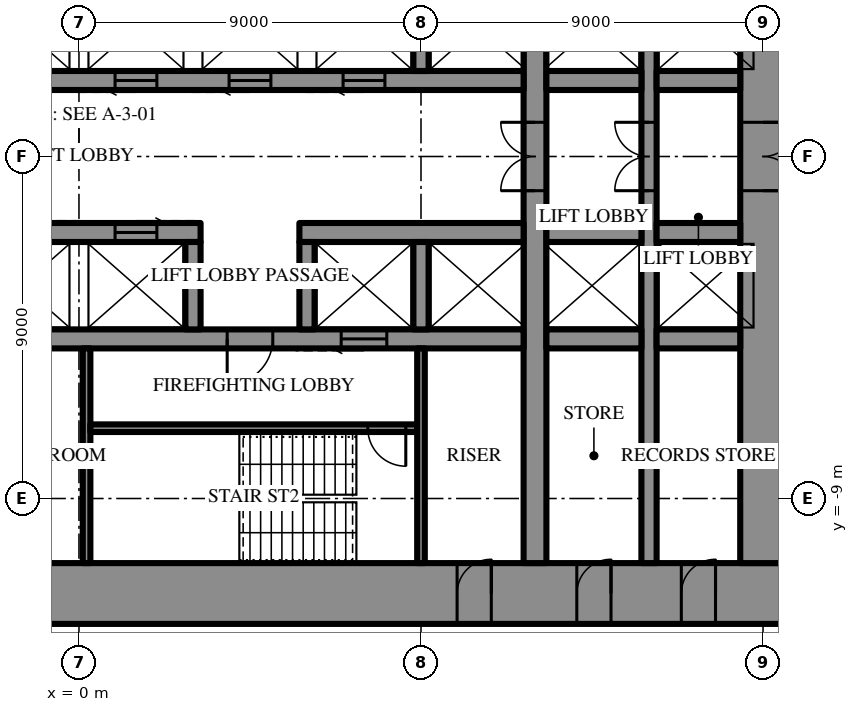
"""IFC4 building model, lengths in metres.
Left out: names, types, materials, properties, quantities, classifications, styles, units other than length and angle.
Written with IfcOpenShell. Run it as: python <this file> out.ifc"""

import sys

from ifc_helpers import new_model, si_unit, direction, frame, frame_2d, origin, place, context, subcontext, project, spatial, rectangle, extrude, element, fill, save


model = new_model("IFC4")
c1 = context("Model", 3, precision=1e-05, world=origin(), true_north=direction((0.0, 1.0)))
c2 = subcontext(c1, "Body", "Model", "MODEL_VIEW")
j1 = project(units=[si_unit("LENGTHUNIT", "METRE"), si_unit("PLANEANGLEUNIT", "RADIAN")], contexts=[c1])
p1 = place(None, origin())
s1 = spatial("IfcSite", under=j1, at=p1, CompositionType="ELEMENT")
p2 = place(p1, origin())
s2 = spatial("IfcBuilding", under=s1, at=p2, CompositionType="ELEMENT")
p3 = place(p2, frame((0.0, 0.0, 31.9)))
s3 = spatial("IfcBuildingStorey", under=s2, at=p3, CompositionType="ELEMENT", Elevation=31.9)
p4 = place(p3, frame((18.6, -11.5, 0.0), z_axis=(0.0, 0.0, 1.0), x_axis=(-1.0, 0.0, 0.0)))
e1 = element("IfcWall", 1, at=p4, inside=s3, PredefinedType="SHEAR", context=c2, shape_type="SweptSolid", body=[
    extrude(rectangle(XDim=37.2, YDim=1.6, at=frame_2d((18.6, 0.0))), origin(), (0.0, 0.0, 1.0), 4.2),
])
p5 = place(p4, frame((19.45, 0.0, 0.0)))
e2 = element("IfcOpeningElement", 2, at=p5, cuts=e1, PredefinedType="OPENING", context=c2, shape_type="SweptSolid", body=[
    extrude(rectangle(XDim=0.9, YDim=2.2, at=frame_2d((0.45, 1.1))), frame((0.0, 0.81, 0.0), z_axis=(0.0, -1.0, 0.0), x_axis=(1.0, 0.0, 0.0)), (0.0, 0.0, 1.0), 1.62),
])
p6 = place(p4, frame((22.45, 0.0, 0.0)))
e3 = element("IfcOpeningElement", 3, at=p6, cuts=e1, PredefinedType="OPENING", context=c2, shape_type="SweptSolid", body=[
    extrude(rectangle(XDim=0.9, YDim=2.2, at=frame_2d((0.45, 1.1))), frame((0.0, 0.81, 0.0), z_axis=(0.0, -1.0, 0.0), x_axis=(1.0, 0.0, 0.0)), (0.0, 0.0, 1.0), 1.62),
])
p7 = place(p4, frame((25.5, 0.0, 0.0)))
e4 = element("IfcOpeningElement", 4, at=p7, cuts=e1, PredefinedType="OPENING", context=c2, shape_type="SweptSolid", body=[
    extrude(rectangle(XDim=1.0, YDim=2.2, at=frame_2d((0.5, 1.1))), frame((0.0, 0.81, 0.0), z_axis=(0.0, -1.0, 0.0), x_axis=(1.0, 0.0, 0.0)), (0.0, 0.0, 1.0), 1.62),
])
p8 = place(p4, frame((1.85, 0.0, 0.0)))
e5 = element("IfcOpeningElement", 5, at=p8, cuts=e1, PredefinedType="OPENING", context=c2, shape_type="SweptSolid", body=[
    extrude(rectangle(XDim=0.9, YDim=2.2, at=frame_2d((0.45, 1.1))), frame((0.0, 0.81, 0.0), z_axis=(0.0, -1.0, 0.0), x_axis=(1.0, 0.0, 0.0)), (0.0, 0.0, 1.0), 1.62),
])
p9 = place(p4, frame((4.6, 0.0, 0.0)))
e6 = element("IfcOpeningElement", 6, at=p9, cuts=e1, PredefinedType="OPENING", context=c2, shape_type="SweptSolid", body=[
    extrude(rectangle(XDim=0.9, YDim=2.2, at=frame_2d((0.45, 1.1))), frame((0.0, 0.81, 0.0), z_axis=(0.0, -1.0, 0.0), x_axis=(1.0, 0.0, 0.0)), (0.0, 0.0, 1.0), 1.62),
])
p10 = place(p4, frame((7.75, 0.0, 0.0)))
e7 = element("IfcOpeningElement", 7, at=p10, cuts=e1, PredefinedType="OPENING", context=c2, shape_type="SweptSolid", body=[
    extrude(rectangle(XDim=0.9, YDim=2.2, at=frame_2d((0.45, 1.1))), frame((0.0, 0.81, 0.0), z_axis=(0.0, -1.0, 0.0), x_axis=(1.0, 0.0, 0.0)), (0.0, 0.0, 1.0), 1.62),
])
p11 = place(p4, frame((28.55, 0.0, 0.0)))
e8 = element("IfcOpeningElement", 8, at=p11, cuts=e1, PredefinedType="OPENING", context=c2, shape_type="SweptSolid", body=[
    extrude(rectangle(XDim=0.9, YDim=2.2, at=frame_2d((0.45, 1.1))), frame((0.0, 0.81, 0.0), z_axis=(0.0, -1.0, 0.0), x_axis=(1.0, 0.0, 0.0)), (0.0, 0.0, 1.0), 1.62),
])
p12 = place(p4, frame((31.7, 0.0, 0.0)))
e9 = element("IfcOpeningElement", 9, at=p12, cuts=e1, PredefinedType="OPENING", context=c2, shape_type="SweptSolid", body=[
    extrude(rectangle(XDim=0.9, YDim=2.2, at=frame_2d((0.45, 1.1))), frame((0.0, 0.81, 0.0), z_axis=(0.0, -1.0, 0.0), x_axis=(1.0, 0.0, 0.0)), (0.0, 0.0, 1.0), 1.62),
])
p13 = place(p4, frame((34.45, 0.0, 0.0)))
e10 = element("IfcOpeningElement", 10, at=p13, cuts=e1, PredefinedType="OPENING", context=c2, shape_type="SweptSolid", body=[
    extrude(rectangle(XDim=0.9, YDim=2.2, at=frame_2d((0.45, 1.1))), frame((0.0, 0.81, 0.0), z_axis=(0.0, -1.0, 0.0), x_axis=(1.0, 0.0, 0.0)), (0.0, 0.0, 1.0), 1.62),
])
p14 = place(p3, frame((18.0, -10.7, 0.0), z_axis=(0.0, 0.0, 1.0), x_axis=(0.0, 1.0, 0.0)))
e11 = element("IfcWall", 11, at=p14, inside=s3, PredefinedType="SHEAR", context=c2, shape_type="SweptSolid", body=[
    extrude(rectangle(XDim=21.4, YDim=1.2, at=frame_2d((10.7, 0.0))), origin(), (0.0, 0.0, 1.0), 4.2),
])
p15 = place(p14, frame((9.8, 0.0, 0.0)))
e12 = element("IfcOpeningElement", 12, at=p15, cuts=e11, PredefinedType="OPENING", context=c2, shape_type="SweptSolid", body=[
    extrude(rectangle(XDim=1.8, YDim=2.4, at=frame_2d((0.9, 1.2))), frame((0.0, 0.61, 0.0), z_axis=(0.0, -1.0, 0.0), x_axis=(1.0, 0.0, 0.0)), (0.0, 0.0, 1.0), 1.22),
])
p16 = place(p3, frame((12.0, -10.7, 0.0), z_axis=(0.0, 0.0, 1.0), x_axis=(0.0, 1.0, 0.0)))
e13 = element("IfcWall", 13, at=p16, inside=s3, PredefinedType="SHEAR", context=c2, shape_type="SweptSolid", body=[
    extrude(rectangle(XDim=21.4, YDim=0.6, at=frame_2d((10.7, 0.0))), origin(), (0.0, 0.0, 1.0), 4.2),
])
p17 = place(p16, frame((9.8, 0.0, 0.0)))
e14 = element("IfcOpeningElement", 14, at=p17, cuts=e13, PredefinedType="OPENING", context=c2, shape_type="SweptSolid", body=[
    extrude(rectangle(XDim=1.8, YDim=2.4, at=frame_2d((0.9, 1.2))), frame((0.0, 0.31, 0.0), z_axis=(0.0, -1.0, 0.0), x_axis=(1.0, 0.0, 0.0)), (0.0, 0.0, 1.0), 0.62),
])
p18 = place(p3, frame((15.0, -10.7, 0.0), z_axis=(0.0, 0.0, 1.0), x_axis=(0.0, 1.0, 0.0)))
e15 = element("IfcWall", 15, at=p18, inside=s3, PredefinedType="SHEAR", context=c2, shape_type="SweptSolid", body=[
    extrude(rectangle(XDim=21.4, YDim=0.4, at=frame_2d((10.7, 0.0))), origin(), (0.0, 0.0, 1.0), 4.2),
])
p19 = place(p18, frame((9.8, 0.0, 0.0)))
e16 = element("IfcOpeningElement", 16, at=p19, cuts=e15, PredefinedType="OPENING", context=c2, shape_type="SweptSolid", body=[
    extrude(rectangle(XDim=1.8, YDim=2.4, at=frame_2d((0.9, 1.2))), frame((0.0, 0.21, 0.0), z_axis=(0.0, -1.0, 0.0), x_axis=(1.0, 0.0, 0.0)), (0.0, 0.0, 1.0), 0.42),
])
p20 = place(p3, frame((-3.2, 2.0, 0.0), z_axis=(0.0, 0.0, 1.0), x_axis=(1.0, 0.0, 0.0)))
e17 = element("IfcWall", 17, at=p20, inside=s3, PredefinedType="SHEAR", context=c2, shape_type="SweptSolid", body=[
    extrude(rectangle(XDim=14.9, YDim=0.5, at=frame_2d((7.45, 0.0))), origin(), (0.0, 0.0, 1.0), 4.2),
])
p21 = place(p20, frame((1.15, 0.0, 0.0)))
e18 = element("IfcOpeningElement", 18, at=p21, cuts=e17, PredefinedType="OPENING", context=c2, shape_type="SweptSolid", body=[
    extrude(rectangle(XDim=1.1, YDim=2.2, at=frame_2d((0.55, 1.1))), frame((0.0, 0.26, 0.0), z_axis=(0.0, -1.0, 0.0), x_axis=(1.0, 0.0, 0.0)), (0.0, 0.0, 1.0), 0.52),
])
p22 = place(p20, frame((4.15, 0.0, 0.0)))
e19 = element("IfcOpeningElement", 19, at=p22, cuts=e17, PredefinedType="OPENING", context=c2, shape_type="SweptSolid", body=[
    extrude(rectangle(XDim=1.1, YDim=2.2, at=frame_2d((0.55, 1.1))), frame((0.0, 0.26, 0.0), z_axis=(0.0, -1.0, 0.0), x_axis=(1.0, 0.0, 0.0)), (0.0, 0.0, 1.0), 0.52),
])
p23 = place(p20, frame((7.15, 0.0, 0.0)))
e20 = element("IfcOpeningElement", 20, at=p23, cuts=e17, PredefinedType="OPENING", context=c2, shape_type="SweptSolid", body=[
    extrude(rectangle(XDim=1.1, YDim=2.2, at=frame_2d((0.55, 1.1))), frame((0.0, 0.26, 0.0), z_axis=(0.0, -1.0, 0.0), x_axis=(1.0, 0.0, 0.0)), (0.0, 0.0, 1.0), 0.52),
])
p24 = place(p20, frame((10.15, 0.0, 0.0)))
e21 = element("IfcOpeningElement", 21, at=p24, cuts=e17, PredefinedType="OPENING", context=c2, shape_type="SweptSolid", body=[
    extrude(rectangle(XDim=1.1, YDim=2.2, at=frame_2d((0.55, 1.1))), frame((0.0, 0.26, 0.0), z_axis=(0.0, -1.0, 0.0), x_axis=(1.0, 0.0, 0.0)), (0.0, 0.0, 1.0), 0.52),
])
p25 = place(p3, frame((12.3, 2.0, 0.0), z_axis=(0.0, 0.0, 1.0), x_axis=(1.0, 0.0, 0.0)))
e22 = element("IfcWall", 22, at=p25, inside=s3, PredefinedType="SHEAR", context=c2, shape_type="SweptSolid", body=[
    extrude(rectangle(XDim=2.5, YDim=0.5, at=frame_2d((1.25, 0.0))), origin(), (0.0, 0.0, 1.0), 4.2),
])
p26 = place(p3, frame((15.2, 2.0, 0.0), z_axis=(0.0, 0.0, 1.0), x_axis=(1.0, 0.0, 0.0)))
e23 = element("IfcWall", 23, at=p26, inside=s3, PredefinedType="SHEAR", context=c2, shape_type="SweptSolid", body=[
    extrude(rectangle(XDim=2.2, YDim=0.5, at=frame_2d((1.1, 0.0))), origin(), (0.0, 0.0, 1.0), 4.2),
])
p27 = place(p3, frame((9.0, 2.25, 0.0), z_axis=(0.0, 0.0, 1.0), x_axis=(0.0, 1.0, 0.0)))
e24 = element("IfcWall", 24, at=p27, inside=s3, PredefinedType="SHEAR", context=c2, shape_type="SweptSolid", body=[
    extrude(rectangle(XDim=2.3, YDim=0.4, at=frame_2d((1.15, 0.0))), origin(), (0.0, 0.0, 1.0), 4.2),
])
p28 = place(p3, frame((17.4, -2.0, 0.0), z_axis=(0.0, 0.0, 1.0), x_axis=(-1.0, 0.0, 0.0)))
e25 = element("IfcWall", 25, at=p28, inside=s3, PredefinedType="SHEAR", context=c2, shape_type="SweptSolid", body=[
    extrude(rectangle(XDim=2.2, YDim=0.5, at=frame_2d((1.1, 0.0))), origin(), (0.0, 0.0, 1.0), 4.2),
])
p29 = place(p3, frame((14.8, -2.0, 0.0), z_axis=(0.0, 0.0, 1.0), x_axis=(-1.0, 0.0, 0.0)))
e26 = element("IfcWall", 26, at=p29, inside=s3, PredefinedType="SHEAR", context=c2, shape_type="SweptSolid", body=[
    extrude(rectangle(XDim=2.5, YDim=0.5, at=frame_2d((1.25, 0.0))), origin(), (0.0, 0.0, 1.0), 4.2),
])
p30 = place(p3, frame((11.7, -2.0, 0.0), z_axis=(0.0, 0.0, 1.0), x_axis=(-1.0, 0.0, 0.0)))
e27 = element("IfcWall", 27, at=p30, inside=s3, PredefinedType="SHEAR", context=c2, shape_type="SweptSolid", body=[
    extrude(rectangle(XDim=5.9, YDim=0.5, at=frame_2d((2.95, 0.0))), origin(), (0.0, 0.0, 1.0), 4.2),
])
p31 = place(p3, frame((3.2, -2.0, 0.0), z_axis=(0.0, 0.0, 1.0), x_axis=(-1.0, 0.0, 0.0)))
e28 = element("IfcWall", 28, at=p31, inside=s3, PredefinedType="SHEAR", context=c2, shape_type="SweptSolid", body=[
    extrude(rectangle(XDim=14.9, YDim=0.5, at=frame_2d((7.45, 0.0))), origin(), (0.0, 0.0, 1.0), 4.2),
])
p32 = place(p31, frame((1.15, 0.0, 0.0)))
e29 = element("IfcOpeningElement", 29, at=p32, cuts=e28, PredefinedType="OPENING", context=c2, shape_type="SweptSolid", body=[
    extrude(rectangle(XDim=1.1, YDim=2.2, at=frame_2d((0.55, 1.1))), frame((0.0, 0.26, 0.0), z_axis=(0.0, -1.0, 0.0), x_axis=(1.0, 0.0, 0.0)), (0.0, 0.0, 1.0), 0.52),
])
p33 = place(p31, frame((4.15, 0.0, 0.0)))
e30 = element("IfcOpeningElement", 30, at=p33, cuts=e28, PredefinedType="OPENING", context=c2, shape_type="SweptSolid", body=[
    extrude(rectangle(XDim=1.1, YDim=2.2, at=frame_2d((0.55, 1.1))), frame((0.0, 0.26, 0.0), z_axis=(0.0, -1.0, 0.0), x_axis=(1.0, 0.0, 0.0)), (0.0, 0.0, 1.0), 0.52),
])
p34 = place(p31, frame((7.15, 0.0, 0.0)))
e31 = element("IfcOpeningElement", 31, at=p34, cuts=e28, PredefinedType="OPENING", context=c2, shape_type="SweptSolid", body=[
    extrude(rectangle(XDim=1.1, YDim=2.2, at=frame_2d((0.55, 1.1))), frame((0.0, 0.26, 0.0), z_axis=(0.0, -1.0, 0.0), x_axis=(1.0, 0.0, 0.0)), (0.0, 0.0, 1.0), 0.52),
])
p35 = place(p31, frame((10.15, 0.0, 0.0)))
e32 = element("IfcOpeningElement", 32, at=p35, cuts=e28, PredefinedType="OPENING", context=c2, shape_type="SweptSolid", body=[
    extrude(rectangle(XDim=1.1, YDim=2.2, at=frame_2d((0.55, 1.1))), frame((0.0, 0.26, 0.0), z_axis=(0.0, -1.0, 0.0), x_axis=(1.0, 0.0, 0.0)), (0.0, 0.0, 1.0), 0.52),
])
p36 = place(p3, frame((17.4, -4.8, 0.0), z_axis=(0.0, 0.0, 1.0), x_axis=(-1.0, 0.0, 0.0)))
e33 = element("IfcWall", 33, at=p36, inside=s3, PredefinedType="SHEAR", context=c2, shape_type="SweptSolid", body=[
    extrude(rectangle(XDim=2.2, YDim=0.5, at=frame_2d((1.1, 0.0))), origin(), (0.0, 0.0, 1.0), 4.2),
])
p37 = place(p3, frame((14.8, -4.8, 0.0), z_axis=(0.0, 0.0, 1.0), x_axis=(-1.0, 0.0, 0.0)))
e34 = element("IfcWall", 34, at=p37, inside=s3, PredefinedType="SHEAR", context=c2, shape_type="SweptSolid", body=[
    extrude(rectangle(XDim=2.5, YDim=0.5, at=frame_2d((1.25, 0.0))), origin(), (0.0, 0.0, 1.0), 4.2),
])
p38 = place(p3, frame((11.7, -4.8, 0.0), z_axis=(0.0, 0.0, 1.0), x_axis=(-1.0, 0.0, 0.0)))
e35 = element("IfcWall", 35, at=p38, inside=s3, PredefinedType="SHEAR", context=c2, shape_type="SweptSolid", body=[
    extrude(rectangle(XDim=23.4, YDim=0.5, at=frame_2d((11.7, 0.0))), origin(), (0.0, 0.0, 1.0), 4.2),
])
p39 = place(p38, frame((6.6, 0.0, 0.0)))
e36 = element("IfcOpeningElement", 36, at=p39, cuts=e35, PredefinedType="OPENING", context=c2, shape_type="SweptSolid", body=[
    extrude(rectangle(XDim=1.2, YDim=2.2, at=frame_2d((0.6, 1.1))), frame((0.0, 0.26, 0.0), z_axis=(0.0, -1.0, 0.0), x_axis=(1.0, 0.0, 0.0)), (0.0, 0.0, 1.0), 0.52),
])
p40 = place(p38, frame((3.6, 0.0, 0.0)))
e37 = element("IfcOpeningElement", 37, at=p40, cuts=e35, PredefinedType="OPENING", context=c2, shape_type="SweptSolid", body=[
    extrude(rectangle(XDim=1.2, YDim=2.2, at=frame_2d((0.6, 1.1))), frame((0.0, 0.26, 0.0), z_axis=(0.0, -1.0, 0.0), x_axis=(1.0, 0.0, 0.0)), (0.0, 0.0, 1.0), 0.52),
])
for number, where, z_axis, x_axis in (
    (38, (9.0, -2.25, 0.0), (0.0, 0.0, 1.0), (0.0, -1.0, 0.0)),
    (39, (6.0, -2.25, 0.0), (0.0, 0.0, 1.0), (0.0, -1.0, 0.0)),
    (40, (3.0, -2.25, 0.0), (0.0, 0.0, 1.0), (0.0, -1.0, 0.0)),
):
    element("IfcWall", number, at=place(p3, frame(where, z_axis=z_axis, x_axis=x_axis)), inside=s3, PredefinedType="SHEAR", context=c2, shape_type="SweptSolid", body=[
        extrude(rectangle(XDim=2.3, YDim=0.4, at=frame_2d((1.15, 0.0))), origin(), (0.0, 0.0, 1.0), 4.2),
    ])
p41 = place(p3, frame((0.2, -5.05, 0.0), z_axis=(0.0, 0.0, 1.0), x_axis=(0.0, -1.0, 0.0)))
e41 = element("IfcWall", 41, at=p41, inside=s3, PredefinedType="SHEAR", context=c2, shape_type="SweptSolid", body=[
    extrude(rectangle(XDim=5.65, YDim=0.2, at=frame_2d((2.825, 0.0))), origin(), (0.0, 0.0, 1.0), 4.2),
])
p42 = place(p3, frame((8.9, -7.15, 0.0), z_axis=(0.0, 0.0, 1.0), x_axis=(-1.0, 0.0, 0.0)))
e42 = element("IfcWall", 42, at=p42, inside=s3, PredefinedType="SHEAR", context=c2, shape_type="SweptSolid", body=[
    extrude(rectangle(XDim=8.6, YDim=0.2, at=frame_2d((4.3, 0.0))), origin(), (0.0, 0.0, 1.0), 4.2),
])
p43 = place(p42, frame((0.3, 0.0, 0.0)))
e43 = element("IfcOpeningElement", 43, at=p43, cuts=e42, PredefinedType="OPENING", context=c2, shape_type="SweptSolid", body=[
    extrude(rectangle(XDim=1.0, YDim=2.2, at=frame_2d((0.5, 1.1))), frame((0.0, 0.11, 0.0), z_axis=(0.0, -1.0, 0.0), x_axis=(1.0, 0.0, 0.0)), (0.0, 0.0, 1.0), 0.22),
])
p44 = place(p3, frame((9.0, -5.05, 0.0), z_axis=(0.0, 0.0, 1.0), x_axis=(0.0, -1.0, 0.0)))
e44 = element("IfcWall", 44, at=p44, inside=s3, PredefinedType="PARTITIONING", context=c2, shape_type="SweptSolid", body=[
    extrude(rectangle(XDim=5.65, YDim=0.2, at=frame_2d((2.825, 0.0))), origin(), (0.0, 0.0, 1.0), 4.0),
])
p45 = place(p15, frame((1.8, 0.0, 0.0), z_axis=(0.0, 0.0, 1.0), x_axis=(-1.0, 0.0, 0.0)))
e45 = element("IfcDoor", 45, at=p45, inside=s3, OperationType="DOUBLE_DOOR_SINGLE_SWING", PredefinedType="DOOR", context=c2, shape_type="SweptSolid", body=[
    extrude(rectangle(XDim=1.8, YDim=2.4, at=frame_2d((0.9, 1.2))), frame((0.0, 0.025, 0.0), z_axis=(0.0, -1.0, 0.0), x_axis=(1.0, 0.0, 0.0)), (0.0, 0.0, 1.0), 0.05),
])
fill(e12, e45)
p46 = place(p39, origin())
e46 = element("IfcDoor", 46, at=p46, inside=s3, OperationType="SINGLE_SWING_LEFT", PredefinedType="DOOR", context=c2, shape_type="SweptSolid", body=[
    extrude(rectangle(XDim=1.2, YDim=2.2, at=frame_2d((0.6, 1.1))), frame((0.0, 0.025, 0.0), z_axis=(0.0, -1.0, 0.0), x_axis=(1.0, 0.0, 0.0)), (0.0, 0.0, 1.0), 0.05),
])
fill(e36, e46)
p47 = place(p43, origin())
e47 = element("IfcDoor", 47, at=p47, inside=s3, OperationType="SINGLE_SWING_RIGHT", PredefinedType="DOOR", context=c2, shape_type="SweptSolid", body=[
    extrude(rectangle(XDim=1.0, YDim=2.2, at=frame_2d((0.5, 1.1))), frame((0.0, 0.025, 0.0), z_axis=(0.0, -1.0, 0.0), x_axis=(1.0, 0.0, 0.0)), (0.0, 0.0, 1.0), 0.05),
])
fill(e43, e47)
p48 = place(p8, frame((0.9, 0.0, 0.0), z_axis=(0.0, 0.0, 1.0), x_axis=(-1.0, 0.0, 0.0)))
e48 = element("IfcDoor", 48, at=p48, inside=s3, OperationType="SINGLE_SWING_LEFT", PredefinedType="DOOR", context=c2, shape_type="SweptSolid", body=[
    extrude(rectangle(XDim=0.9, YDim=2.2, at=frame_2d((0.45, 1.1))), frame((0.0, 0.025, 0.0), z_axis=(0.0, -1.0, 0.0), x_axis=(1.0, 0.0, 0.0)), (0.0, 0.0, 1.0), 0.05),
])
fill(e5, e48)
p49 = place(p9, frame((0.9, 0.0, 0.0), z_axis=(0.0, 0.0, 1.0), x_axis=(-1.0, 0.0, 0.0)))
e49 = element("IfcDoor", 49, at=p49, inside=s3, OperationType="SINGLE_SWING_LEFT", PredefinedType="DOOR", context=c2, shape_type="SweptSolid", body=[
    extrude(rectangle(XDim=0.9, YDim=2.2, at=frame_2d((0.45, 1.1))), frame((0.0, 0.025, 0.0), z_axis=(0.0, -1.0, 0.0), x_axis=(1.0, 0.0, 0.0)), (0.0, 0.0, 1.0), 0.05),
])
fill(e6, e49)
p50 = place(p10, frame((0.9, 0.0, 0.0), z_axis=(0.0, 0.0, 1.0), x_axis=(-1.0, 0.0, 0.0)))
e50 = element("IfcDoor", 50, at=p50, inside=s3, OperationType="SINGLE_SWING_LEFT", PredefinedType="DOOR", context=c2, shape_type="SweptSolid", body=[
    extrude(rectangle(XDim=0.9, YDim=2.2, at=frame_2d((0.45, 1.1))), frame((0.0, 0.025, 0.0), z_axis=(0.0, -1.0, 0.0), x_axis=(1.0, 0.0, 0.0)), (0.0, 0.0, 1.0), 0.05),
])
fill(e7, e50)
p51 = place(p17, origin())
e51 = element("IfcDoor", 51, at=p51, inside=s3, OperationType="DOUBLE_DOOR_SINGLE_SWING", PredefinedType="DOOR", context=c2, shape_type="SweptSolid", body=[
    extrude(rectangle(XDim=1.8, YDim=2.4, at=frame_2d((0.9, 1.2))), frame((0.0, 0.025, 0.0), z_axis=(0.0, -1.0, 0.0), x_axis=(1.0, 0.0, 0.0)), (0.0, 0.0, 1.0), 0.05),
])
fill(e14, e51)
p52 = place(p19, origin())
e52 = element("IfcDoor", 52, at=p52, inside=s3, OperationType="DOUBLE_DOOR_SINGLE_SWING", PredefinedType="DOOR", context=c2, shape_type="SweptSolid", body=[
    extrude(rectangle(XDim=1.8, YDim=2.4, at=frame_2d((0.9, 1.2))), frame((0.0, 0.025, 0.0), z_axis=(0.0, -1.0, 0.0), x_axis=(1.0, 0.0, 0.0)), (0.0, 0.0, 1.0), 0.05),
])
fill(e16, e52)
p53 = place(p22, frame((1.1, 0.0, 0.0), z_axis=(0.0, 0.0, 1.0), x_axis=(-1.0, 0.0, 0.0)))
e53 = element("IfcDoor", 53, at=p53, inside=s3, OperationType="SLIDING_TO_LEFT", PredefinedType="DOOR", context=c2, shape_type="SweptSolid", body=[
    extrude(rectangle(XDim=1.1, YDim=2.2, at=frame_2d((0.55, 1.1))), frame((0.0, 0.025, 0.0), z_axis=(0.0, -1.0, 0.0), x_axis=(1.0, 0.0, 0.0)), (0.0, 0.0, 1.0), 0.05),
])
fill(e19, e53)
p54 = place(p23, frame((1.1, 0.0, 0.0), z_axis=(0.0, 0.0, 1.0), x_axis=(-1.0, 0.0, 0.0)))
e54 = element("IfcDoor", 54, at=p54, inside=s3, OperationType="SLIDING_TO_LEFT", PredefinedType="DOOR", context=c2, shape_type="SweptSolid", body=[
    extrude(rectangle(XDim=1.1, YDim=2.2, at=frame_2d((0.55, 1.1))), frame((0.0, 0.025, 0.0), z_axis=(0.0, -1.0, 0.0), x_axis=(1.0, 0.0, 0.0)), (0.0, 0.0, 1.0), 0.05),
])
fill(e20, e54)
p55 = place(p24, frame((1.1, 0.0, 0.0), z_axis=(0.0, 0.0, 1.0), x_axis=(-1.0, 0.0, 0.0)))
e55 = element("IfcDoor", 55, at=p55, inside=s3, OperationType="SLIDING_TO_LEFT", PredefinedType="DOOR", context=c2, shape_type="SweptSolid", body=[
    extrude(rectangle(XDim=1.1, YDim=2.2, at=frame_2d((0.55, 1.1))), frame((0.0, 0.025, 0.0), z_axis=(0.0, -1.0, 0.0), x_axis=(1.0, 0.0, 0.0)), (0.0, 0.0, 1.0), 0.05),
])
fill(e21, e55)
p56 = place(p40, origin())
e56 = element("IfcDoor", 56, at=p56, inside=s3, OperationType="SLIDING_TO_LEFT", PredefinedType="DOOR", context=c2, shape_type="SweptSolid", body=[
    extrude(rectangle(XDim=1.2, YDim=2.2, at=frame_2d((0.6, 1.1))), frame((0.0, 0.025, 0.0), z_axis=(0.0, -1.0, 0.0), x_axis=(1.0, 0.0, 0.0)), (0.0, 0.0, 1.0), 0.05),
])
fill(e37, e56)
p57 = place(p32, frame((1.1, 0.0, 0.0), z_axis=(0.0, 0.0, 1.0), x_axis=(-1.0, 0.0, 0.0)))
e57 = element("IfcDoor", 57, at=p57, inside=s3, OperationType="SLIDING_TO_LEFT", PredefinedType="DOOR", context=c2, shape_type="SweptSolid", body=[
    extrude(rectangle(XDim=1.1, YDim=2.2, at=frame_2d((0.55, 1.1))), frame((0.0, 0.025, 0.0), z_axis=(0.0, -1.0, 0.0), x_axis=(1.0, 0.0, 0.0)), (0.0, 0.0, 1.0), 0.05),
])
fill(e29, e57)
save(model, sys.argv[1])
